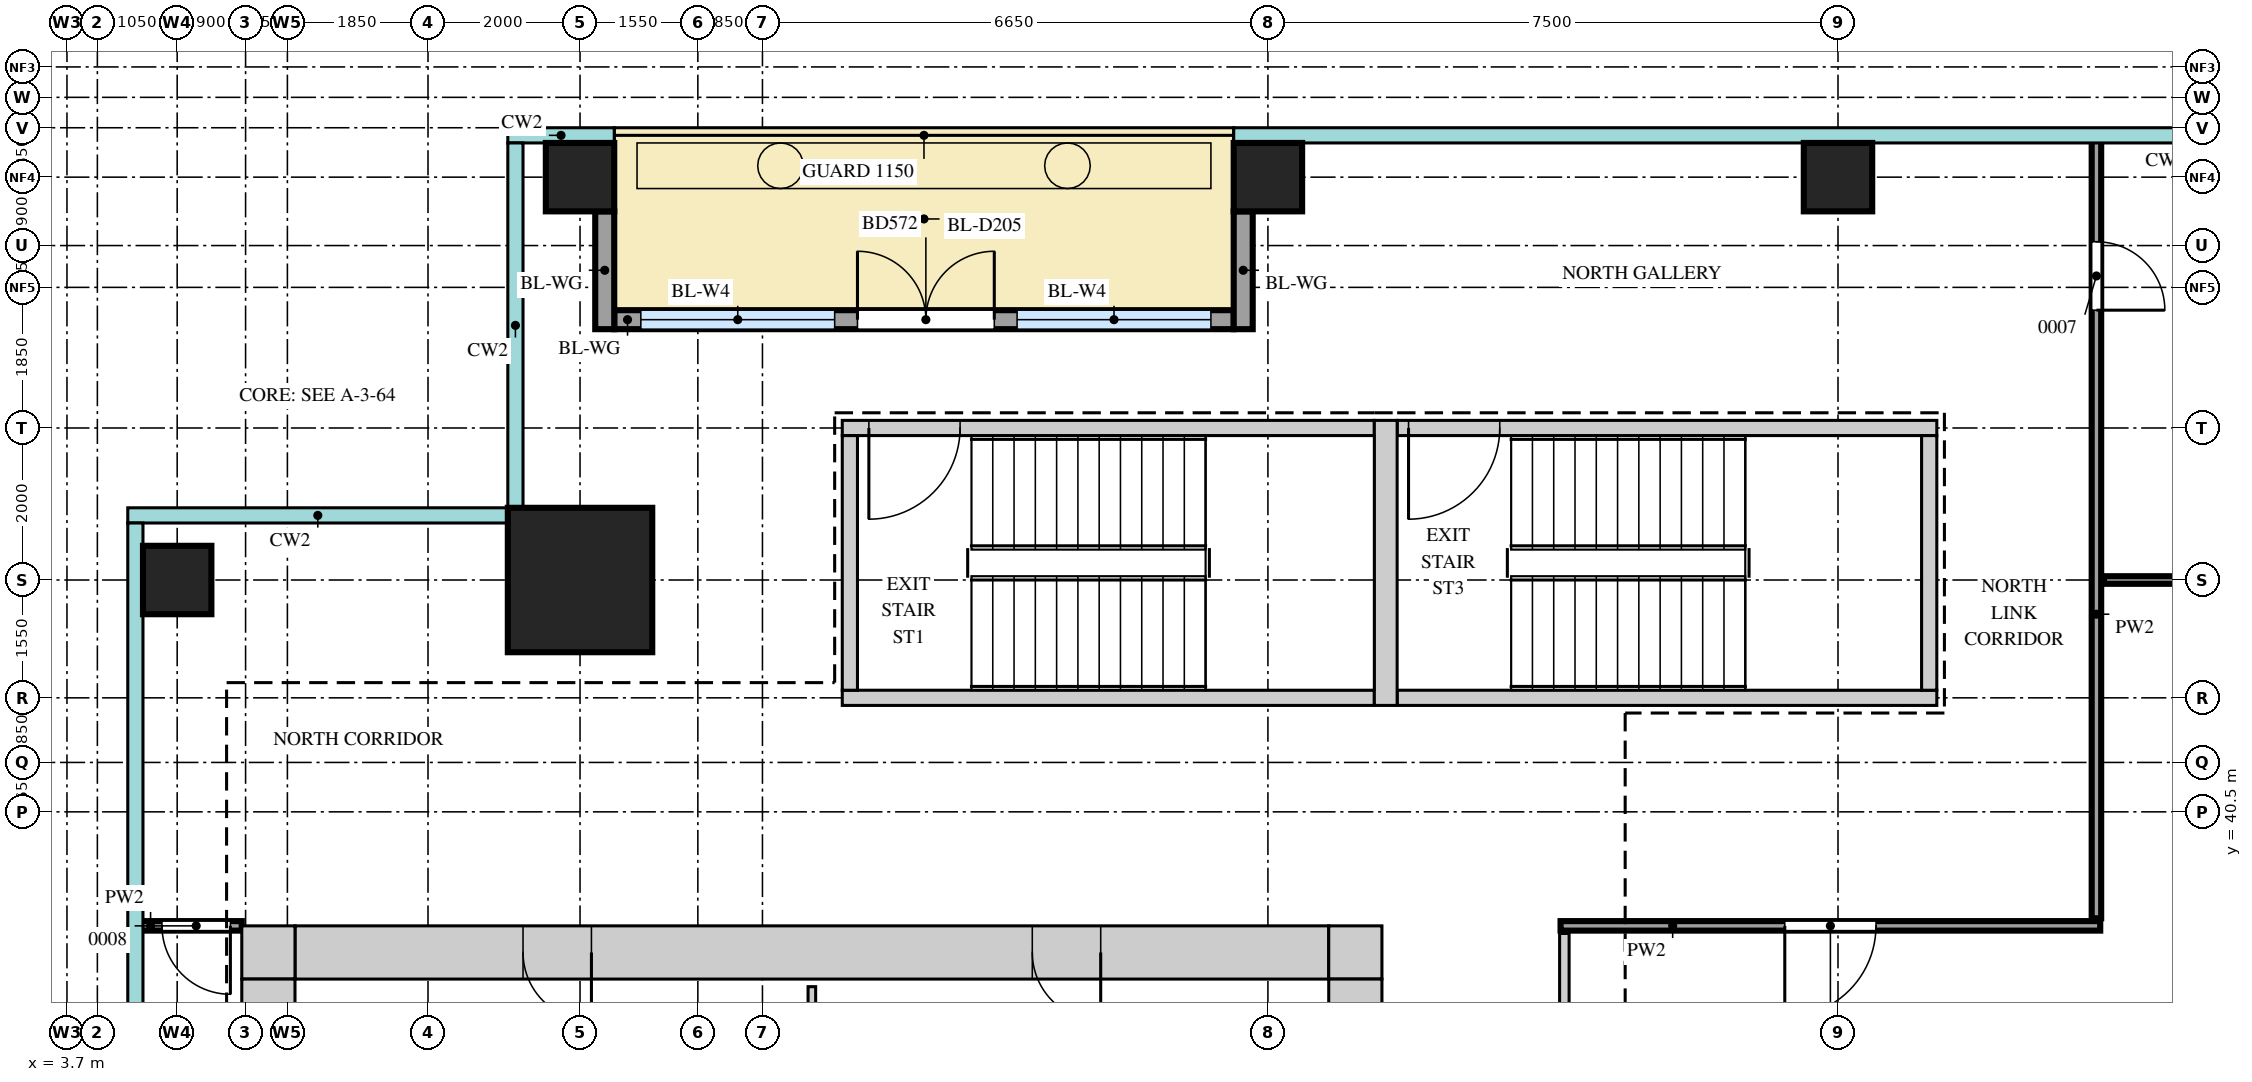
"""IFC4 building model, lengths in metres.
Left out: names, types, materials, properties, quantities, classifications, styles, units other than length and angle.
Written with IfcOpenShell. Run it as: python <this file> out.ifc"""

import sys

from ifc_helpers import new_model, si_unit, direction, frame, frame_2d, origin, origin_2d, place, context, subcontext, project, spatial, rectangle, extrude, source, transform, mapped, element, fill, save


model = new_model("IFC4")
c1 = context("Model", 3, precision=1e-05, world=origin(), true_north=direction((0.0, 1.0)))
c2 = subcontext(c1, "Body", "Model", "MODEL_VIEW")
j1 = project(units=[si_unit("LENGTHUNIT", "METRE"), si_unit("PLANEANGLEUNIT", "RADIAN")], contexts=[c1])
p1 = place(None, origin())
s1 = spatial("IfcSite", under=j1, at=p1, CompositionType="ELEMENT")
p2 = place(p1, origin())
s2 = spatial("IfcBuilding", under=s1, at=p2, CompositionType="ELEMENT")
p3 = place(p2, frame((0.0, 0.0, 254.2)))
s3 = spatial("IfcBuildingStorey", under=s2, at=p3, CompositionType="ELEMENT", Elevation=254.2)
m1 = source(origin(), c2, "Body", "SweptSolid", [
    extrude(rectangle(XDim=13.6, YDim=0.7, at=frame_2d((6.8, 0.0))), origin(), (0.0, 0.0, 1.0), 3.75),
])
p4 = place(p3, frame((6.7, 38.65, 0.0), z_axis=(0.0, 0.0, 1.0), x_axis=(1.0, 0.0, 0.0)))
e1 = element("IfcWall", 1, at=p4, inside=s3, PredefinedType="SHEAR", context=c2, shape_type="MappedRepresentation", body=[
    mapped(m1, transform((0.0, 0.0, 0.0))),
])
m2 = source(origin(), c2, "Body", "SweptSolid", [
    extrude(rectangle(XDim=0.9, YDim=2.1, at=frame_2d((0.45, 1.05))), frame((0.0, 0.36, 0.0), z_axis=(0.0, -1.0, 0.0), x_axis=(1.0, 0.0, 0.0)), (0.0, 0.0, 1.0), 0.72),
])
p5 = place(p4, frame((3.0, 0.0, 0.0)))
e2 = element("IfcOpeningElement", 2, at=p5, cuts=e1, PredefinedType="OPENING", context=c2, shape_type="MappedRepresentation", body=[
    mapped(m2, transform((0.0, 0.0, 0.0))),
])
p6 = place(p4, frame((9.7, 0.0, 0.0)))
e3 = element("IfcOpeningElement", 3, at=p6, cuts=e1, PredefinedType="OPENING", context=c2, shape_type="MappedRepresentation", body=[
    mapped(m2, transform((0.0, 0.0, 0.0))),
])
m3 = source(origin(), c2, "Body", "SweptSolid", [
    extrude(rectangle(XDim=0.7, YDim=0.7, at=frame_2d((0.35, 0.0))), origin(), (0.0, 0.0, 1.0), 3.75),
])
for number, where, z_axis, x_axis in (
    (4, (20.3, 38.65, 0.0), (0.0, 0.0, 1.0), (1.0, 0.0, 0.0)),
    (5, (6.0, 38.65, 0.0), (0.0, 0.0, 1.0), (1.0, 0.0, 0.0)),
):
    element("IfcWall", number, at=place(p3, frame(where, z_axis=z_axis, x_axis=x_axis)), inside=s3, PredefinedType="SHEAR", context=c2, shape_type="MappedRepresentation", body=[
        mapped(m3, transform((0.0, 0.0, 0.0))),
    ])
m4 = source(origin(), c2, "Body", "SweptSolid", [
    extrude(rectangle(XDim=22.6, YDim=0.7, at=frame_2d((11.3, 0.0))), origin(), (0.0, 0.0, 1.0), 3.75),
])
p7 = place(p3, frame((20.65, 15.7, 0.0), z_axis=(0.0, 0.0, 1.0), x_axis=(0.0, 1.0, 0.0)))
e6 = element("IfcWall", 6, at=p7, inside=s3, PredefinedType="SHEAR", context=c2, shape_type="MappedRepresentation", body=[
    mapped(m4, transform((0.0, 0.0, 0.0))),
])
m5 = source(origin(), c2, "Body", "SweptSolid", [
    extrude(rectangle(XDim=1.8, YDim=2.1, at=frame_2d((0.9, 1.05))), frame((0.0, 0.36, 0.0), z_axis=(0.0, -1.0, 0.0), x_axis=(1.0, 0.0, 0.0)), (0.0, 0.0, 1.0), 0.72),
])
p8 = place(p7, frame((10.8, 0.0, 0.0)))
e7 = element("IfcOpeningElement", 7, at=p8, cuts=e6, PredefinedType="OPENING", context=c2, shape_type="MappedRepresentation", body=[
    mapped(m5, transform((0.0, 0.0, 0.0))),
])
p9 = place(p7, frame((0.45, 0.0, 0.0)))
e8 = element("IfcOpeningElement", 8, at=p9, cuts=e6, PredefinedType="OPENING", context=c2, shape_type="MappedRepresentation", body=[
    mapped(m2, transform((0.0, 0.0, 0.0))),
])
p10 = place(p7, frame((2.9, 0.0, 0.0)))
e9 = element("IfcOpeningElement", 9, at=p10, cuts=e6, PredefinedType="OPENING", context=c2, shape_type="MappedRepresentation", body=[
    mapped(m2, transform((0.0, 0.0, 0.0))),
])
p11 = place(p7, frame((5.65, 0.0, 0.0)))
e10 = element("IfcOpeningElement", 10, at=p11, cuts=e6, PredefinedType="OPENING", context=c2, shape_type="MappedRepresentation", body=[
    mapped(m2, transform((0.0, 0.0, 0.0))),
])
p12 = place(p3, frame((6.35, 15.7, 0.0), z_axis=(0.0, 0.0, 1.0), x_axis=(0.0, 1.0, 0.0)))
e11 = element("IfcWall", 11, at=p12, inside=s3, PredefinedType="SHEAR", context=c2, shape_type="MappedRepresentation", body=[
    mapped(m4, transform((0.0, 0.0, 0.0))),
])
m6 = source(origin(), c2, "Body", "SweptSolid", [
    extrude(rectangle(XDim=7.0, YDim=0.2, at=frame_2d((3.5, 0.0))), origin(), (0.0, 0.0, 1.0), 3.75),
])
p13 = place(p3, frame((13.9, 45.55, 0.0), z_axis=(0.0, 0.0, 1.0), x_axis=(1.0, 0.0, 0.0)))
e12 = element("IfcWall", 12, at=p13, inside=s3, PredefinedType="SHEAR", context=c2, shape_type="MappedRepresentation", body=[
    mapped(m6, transform((0.0, 0.0, 0.0))),
])
m7 = source(origin(), c2, "Body", "SweptSolid", [
    extrude(rectangle(XDim=1.2, YDim=2.1, at=frame_2d((0.6, 1.05))), frame((0.0, 0.11, 0.0), z_axis=(0.0, -1.0, 0.0), x_axis=(1.0, 0.0, 0.0)), (0.0, 0.0, 1.0), 0.22),
])
p14 = place(p13, frame((0.35, 0.0, 0.0)))
e13 = element("IfcOpeningElement", 13, at=p14, cuts=e12, PredefinedType="OPENING", context=c2, shape_type="MappedRepresentation", body=[
    mapped(m7, transform((0.0, 0.0, 0.0))),
])
p15 = place(p3, frame((13.9, 42.0, 0.0), z_axis=(0.0, 0.0, 1.0), x_axis=(1.0, 0.0, 0.0)))
e14 = element("IfcWall", 14, at=p15, inside=s3, PredefinedType="SHEAR", context=c2, shape_type="MappedRepresentation", body=[
    mapped(m6, transform((0.0, 0.0, 0.0))),
])
m8 = source(origin(), c2, "Body", "SweptSolid", [
    extrude(rectangle(XDim=7.1, YDim=0.2, at=frame_2d((3.55, 0.0))), origin(), (0.0, 0.0, 1.0), 3.75),
])
p16 = place(p3, frame((21.2, 45.55, 0.0), z_axis=(0.0, 0.0, 1.0), x_axis=(1.0, 0.0, 0.0)))
e15 = element("IfcWall", 15, at=p16, inside=s3, PredefinedType="SHEAR", context=c2, shape_type="MappedRepresentation", body=[
    mapped(m8, transform((0.0, 0.0, 0.0))),
])
p17 = place(p16, frame((0.15, 0.0, 0.0)))
e16 = element("IfcOpeningElement", 16, at=p17, cuts=e15, PredefinedType="OPENING", context=c2, shape_type="MappedRepresentation", body=[
    mapped(m7, transform((0.0, 0.0, 0.0))),
])
p18 = place(p3, frame((21.2, 42.0, 0.0), z_axis=(0.0, 0.0, 1.0), x_axis=(1.0, 0.0, 0.0)))
e17 = element("IfcWall", 17, at=p18, inside=s3, PredefinedType="SHEAR", context=c2, shape_type="MappedRepresentation", body=[
    mapped(m8, transform((0.0, 0.0, 0.0))),
])
m9 = source(origin(), c2, "Body", "SweptSolid", [
    extrude(rectangle(XDim=3.75, YDim=0.3, at=frame_2d((1.875, 0.0))), origin(), (0.0, 0.0, 1.0), 3.75),
])
p19 = place(p3, frame((21.05, 41.9, 0.0), z_axis=(0.0, 0.0, 1.0), x_axis=(0.0, 1.0, 0.0)))
e18 = element("IfcWall", 18, at=p19, inside=s3, PredefinedType="SHEAR", context=c2, shape_type="MappedRepresentation", body=[
    mapped(m9, transform((0.0, 0.0, 0.0))),
])
m10 = source(origin(), c2, "Body", "SweptSolid", [
    extrude(rectangle(XDim=3.35, YDim=0.2, at=frame_2d((1.675, 0.0))), origin(), (0.0, 0.0, 1.0), 3.75),
])
for number, where, z_axis, x_axis in (
    (19, (14.0, 42.1, 0.0), (0.0, 0.0, 1.0), (0.0, 1.0, 0.0)),
    (20, (28.2, 42.1, 0.0), (0.0, 0.0, 1.0), (0.0, 1.0, 0.0)),
):
    element("IfcWall", number, at=place(p3, frame(where, z_axis=z_axis, x_axis=x_axis)), inside=s3, PredefinedType="SHEAR", context=c2, shape_type="MappedRepresentation", body=[
        mapped(m10, transform((0.0, 0.0, 0.0))),
    ])
m11 = source(origin(), c2, "Body", "SweptSolid", [
    extrude(rectangle(XDim=1.9, YDim=1.9, at=origin_2d()), origin(), (0.0, 0.0, 1.0), 4.0),
])
p20 = place(p3, frame((10.45, 43.55, 0.0), z_axis=(0.0, 0.0, 1.0), x_axis=(1.0, 0.0, 0.0)))
e21 = element("IfcColumn", 21, at=p20, inside=s3, PredefinedType="COLUMN", context=c2, shape_type="MappedRepresentation", body=[
    mapped(m11, transform((0.0, 0.0, 0.0))),
])
m12 = source(origin(), c2, "Body", "SweptSolid", [
    extrude(rectangle(XDim=0.9, YDim=0.9, at=origin_2d()), origin(), (0.0, 0.0, 1.0), 3.75),
])
for number, where, z_axis, x_axis in (
    (22, (10.45, 48.85, 0.0), (0.0, 0.0, 1.0), (1.0, 0.0, 0.0)),
    (23, (19.5, 48.85, 0.0), (0.0, 0.0, 1.0), (1.0, 0.0, 0.0)),
    (24, (27.0, 48.85, 0.0), (0.0, 0.0, 1.0), (1.0, 0.0, 0.0)),
    (25, (5.15, 43.55, 0.0), (0.0, 0.0, 1.0), (1.0, 0.0, 0.0)),
):
    element("IfcColumn", number, at=place(p3, frame(where, z_axis=z_axis, x_axis=x_axis)), inside=s3, PredefinedType="COLUMN", context=c2, shape_type="MappedRepresentation", body=[
        mapped(m12, transform((0.0, 0.0, 0.0))),
    ])
m13 = source(origin(), c2, "Body", "SweptSolid", [
    extrude(rectangle(XDim=8.15, YDim=0.25, at=frame_2d((4.075, 0.0))), origin(), (0.0, 0.0, 1.0), 3.35),
])
p21 = place(p3, frame((10.9, 46.975, 0.0), z_axis=(0.0, 0.0, 1.0), x_axis=(1.0, 0.0, 0.0)))
e26 = element("IfcWall", 26, at=p21, inside=s3, PredefinedType="SOLIDWALL", context=c2, shape_type="MappedRepresentation", body=[
    mapped(m13, transform((0.0, 0.0, 0.0))),
])
m14 = source(origin(), c2, "Body", "SweptSolid", [
    extrude(rectangle(XDim=2.55, YDim=2.4, at=frame_2d((1.275, 1.2))), frame((0.0, 0.135, 0.0), z_axis=(0.0, -1.0, 0.0), x_axis=(1.0, 0.0, 0.0)), (0.0, 0.0, 1.0), 0.27),
])
p22 = place(p21, frame((0.35, 0.0, 0.0)))
e27 = element("IfcOpeningElement", 27, at=p22, cuts=e26, PredefinedType="OPENING", context=c2, shape_type="MappedRepresentation", body=[
    mapped(m14, transform((0.0, 0.0, 0.0))),
])
p23 = place(p21, frame((5.3, 0.0, 0.0)))
e28 = element("IfcOpeningElement", 28, at=p23, cuts=e26, PredefinedType="OPENING", context=c2, shape_type="MappedRepresentation", body=[
    mapped(m14, transform((0.0, 0.0, 0.0))),
])
m15 = source(origin(), c2, "Body", "SweptSolid", [
    extrude(rectangle(XDim=1.8, YDim=2.4, at=frame_2d((0.9, 1.2))), frame((0.0, 0.135, 0.0), z_axis=(0.0, -1.0, 0.0), x_axis=(1.0, 0.0, 0.0)), (0.0, 0.0, 1.0), 0.27),
])
p24 = place(p21, frame((3.2, 0.0, 0.0)))
e29 = element("IfcOpeningElement", 29, at=p24, cuts=e26, PredefinedType="OPENING", context=c2, shape_type="MappedRepresentation", body=[
    mapped(m15, transform((0.0, 0.0, 0.0))),
])
m16 = source(origin(), c2, "Body", "SweptSolid", [
    extrude(rectangle(XDim=1.55, YDim=0.25, at=frame_2d((0.775, 0.0))), origin(), (0.0, 0.0, 1.0), 3.35),
])
for number, where, z_axis, x_axis in (
    (30, (10.775, 48.4, 0.0), (0.0, 0.0, 1.0), (0.0, -1.0, 0.0)),
    (31, (19.175, 48.4, 0.0), (0.0, 0.0, 1.0), (0.0, -1.0, 0.0)),
):
    element("IfcWall", number, at=place(p3, frame(where, z_axis=z_axis, x_axis=x_axis)), inside=s3, PredefinedType="SOLIDWALL", context=c2, shape_type="MappedRepresentation", body=[
        mapped(m16, transform((0.0, 0.0, 0.0))),
    ])
m17 = source(origin(), c2, "Body", "SweptSolid", [
    extrude(rectangle(XDim=20.8, YDim=0.125, at=frame_2d((10.4, 0.0))), origin(), (0.0, 0.0, 1.0), 3.8),
])
p25 = place(p3, frame((23.4, 18.1, 0.0), z_axis=(0.0, 0.0, 1.0), x_axis=(0.0, 1.0, 0.0)))
e32 = element("IfcWall", 32, at=p25, inside=s3, PredefinedType="PARTITIONING", context=c2, shape_type="MappedRepresentation", body=[
    mapped(m17, transform((0.0, 0.0, 0.0))),
])
m18 = source(origin(), c2, "Body", "SweptSolid", [
    extrude(rectangle(XDim=1.2, YDim=2.1, at=frame_2d((0.6, 1.05))), frame((0.0, 0.073, 0.0), z_axis=(0.0, -1.0, 0.0), x_axis=(1.0, 0.0, 0.0)), (0.0, 0.0, 1.0), 0.145),
])
p26 = place(p25, frame((12.05, 0.0, 0.0)))
e33 = element("IfcOpeningElement", 33, at=p26, cuts=e32, PredefinedType="OPENING", context=c2, shape_type="MappedRepresentation", body=[
    mapped(m18, transform((0.0, 0.0, 0.0))),
])
m19 = source(origin(), c2, "Body", "SweptSolid", [
    extrude(rectangle(XDim=6.0, YDim=0.1, at=frame_2d((3.0, 0.0))), origin(), (0.0, 0.0, 1.0), 3.8),
])
p27 = place(p3, frame((13.5, 32.2, 0.0), z_axis=(0.0, 0.0, 1.0), x_axis=(0.0, 1.0, 0.0)))
e34 = element("IfcWall", 34, at=p27, inside=s3, PredefinedType="PARTITIONING", context=c2, shape_type="MappedRepresentation", body=[
    mapped(m19, transform((0.0, 0.0, 0.0))),
])
m20 = source(origin(), c2, "Body", "SweptSolid", [
    extrude(rectangle(XDim=1.35, YDim=0.125, at=frame_2d((0.675, 0.0))), origin(), (0.0, 0.0, 1.0), 3.8),
])
p28 = place(p3, frame((4.65, 39.0, 0.0), z_axis=(0.0, 0.0, 1.0), x_axis=(1.0, 0.0, 0.0)))
e35 = element("IfcWall", 35, at=p28, inside=s3, PredefinedType="PARTITIONING", context=c2, shape_type="MappedRepresentation", body=[
    mapped(m20, transform((0.0, 0.0, 0.0))),
])
m21 = source(origin(), c2, "Body", "SweptSolid", [
    extrude(rectangle(XDim=0.9, YDim=2.1, at=frame_2d((0.45, 1.05))), frame((0.0, 0.073, 0.0), z_axis=(0.0, -1.0, 0.0), x_axis=(1.0, 0.0, 0.0)), (0.0, 0.0, 1.0), 0.145),
])
p29 = place(p28, frame((0.3, 0.0, 0.0)))
e36 = element("IfcOpeningElement", 36, at=p29, cuts=e35, PredefinedType="OPENING", context=c2, shape_type="MappedRepresentation", body=[
    mapped(m21, transform((0.0, 0.0, 0.0))),
])
m22 = source(origin(), c2, "Body", "SweptSolid", [
    extrude(rectangle(XDim=7.1, YDim=0.125, at=frame_2d((3.55, 0.0))), origin(), (0.0, 0.0, 1.0), 3.8),
])
p30 = place(p3, frame((23.35, 39.0, 0.0), z_axis=(0.0, 0.0, 1.0), x_axis=(1.0, 0.0, 0.0)))
e37 = element("IfcWall", 37, at=p30, inside=s3, PredefinedType="PARTITIONING", context=c2, shape_type="MappedRepresentation", body=[
    mapped(m22, transform((0.0, 0.0, 0.0))),
])
p31 = place(p30, frame((2.95, 0.0, 0.0)))
e38 = element("IfcOpeningElement", 38, at=p31, cuts=e37, PredefinedType="OPENING", context=c2, shape_type="MappedRepresentation", body=[
    mapped(m18, transform((0.0, 0.0, 0.0))),
])
m23 = source(origin(), c2, "Body", "SweptSolid", [
    extrude(rectangle(XDim=10.25, YDim=0.125, at=frame_2d((5.125, 0.0))), origin(), (0.0, 0.0, 1.0), 3.8),
])
p32 = place(p3, frame((30.4, 39.1, 0.0), z_axis=(0.0, 0.0, 1.0), x_axis=(0.0, 1.0, 0.0)))
e39 = element("IfcWall", 39, at=p32, inside=s3, PredefinedType="PARTITIONING", context=c2, shape_type="MappedRepresentation", body=[
    mapped(m23, transform((0.0, 0.0, 0.0))),
])
p33 = place(p32, frame((8.0, 0.0, 0.0)))
e40 = element("IfcOpeningElement", 40, at=p33, cuts=e39, PredefinedType="OPENING", context=c2, shape_type="MappedRepresentation", body=[
    mapped(m21, transform((0.0, 0.0, 0.0))),
])
m24 = source(origin(), c2, "Body", "SweptSolid", [
    extrude(rectangle(XDim=18.85, YDim=0.1, at=frame_2d((9.425, 0.0))), origin(), (0.0, 0.0, 1.0), 3.3),
])
p34 = place(p3, frame((30.5, 43.55, 0.0), z_axis=(0.0, 0.0, 1.0), x_axis=(1.0, 0.0, 0.0)))
e41 = element("IfcWall", 41, at=p34, inside=s3, PredefinedType="PARTITIONING", context=c2, shape_type="MappedRepresentation", body=[
    mapped(m24, transform((0.0, 0.0, 0.0))),
])
m25 = source(origin(), c2, "Body", "SweptSolid", [
    extrude(rectangle(XDim=2.55, YDim=2.4, at=frame_2d((1.275, 1.2))), frame((0.0, 0.03, 0.0), z_axis=(0.0, -1.0, 0.0), x_axis=(1.0, 0.0, 0.0)), (0.0, 0.0, 1.0), 0.06),
])
p35 = place(p22, origin())
e42 = element("IfcWindow", 42, at=p35, inside=s3, PartitioningType="SINGLE_PANEL", PredefinedType="WINDOW", context=c2, shape_type="MappedRepresentation", body=[
    mapped(m25, transform((0.0, 0.0, 0.0))),
])
fill(e27, e42)
p36 = place(p23, origin())
e43 = element("IfcWindow", 43, at=p36, inside=s3, PartitioningType="SINGLE_PANEL", PredefinedType="WINDOW", context=c2, shape_type="MappedRepresentation", body=[
    mapped(m25, transform((0.0, 0.0, 0.0))),
])
fill(e28, e43)
m26 = source(origin(), c2, "Body", "SweptSolid", [
    extrude(rectangle(XDim=1.8, YDim=2.4, at=frame_2d((0.9, 1.2))), frame((0.0, 0.025, 0.0), z_axis=(0.0, -1.0, 0.0), x_axis=(1.0, 0.0, 0.0)), (0.0, 0.0, 1.0), 0.05),
])
p37 = place(p24, origin())
e44 = element("IfcDoor", 44, at=p37, inside=s3, OperationType="DOUBLE_DOOR_DOUBLE_SWING", PredefinedType="DOOR", context=c2, shape_type="MappedRepresentation", body=[
    mapped(m26, transform((0.0, 0.0, 0.0))),
])
fill(e29, e44)
m27 = source(origin(), c2, "Body", "SweptSolid", [
    extrude(rectangle(XDim=0.9, YDim=2.1, at=frame_2d((0.45, 1.05))), frame((0.0, 0.3, 0.0), z_axis=(0.0, -1.0, 0.0), x_axis=(1.0, 0.0, 0.0)), (0.0, 0.0, 1.0), 0.6),
])
p38 = place(p5, origin())
e45 = element("IfcDoor", 45, at=p38, inside=s3, OperationType="SINGLE_SWING_RIGHT", PredefinedType="DOOR", context=c2, shape_type="MappedRepresentation", body=[
    mapped(m27, transform((0.0, 0.0, 0.0))),
])
fill(e2, e45)
p39 = place(p6, origin())
e46 = element("IfcDoor", 46, at=p39, inside=s3, OperationType="SINGLE_SWING_RIGHT", PredefinedType="DOOR", context=c2, shape_type="MappedRepresentation", body=[
    mapped(m27, transform((0.0, 0.0, 0.0))),
])
fill(e3, e46)
m28 = source(origin(), c2, "Body", "SweptSolid", [
    extrude(rectangle(XDim=0.9, YDim=2.1, at=frame_2d((0.45, 1.05))), frame((0.0, 0.025, 0.0), z_axis=(0.0, -1.0, 0.0), x_axis=(1.0, 0.0, 0.0)), (0.0, 0.0, 1.0), 0.05),
])
p40 = place(p29, origin())
e47 = element("IfcDoor", 47, at=p40, inside=s3, OperationType="SINGLE_SWING_RIGHT", PredefinedType="DOOR", context=c2, shape_type="MappedRepresentation", body=[
    mapped(m28, transform((0.0, 0.0, 0.0))),
])
fill(e36, e47)
m29 = source(origin(), c2, "Body", "SweptSolid", [
    extrude(rectangle(XDim=1.2, YDim=2.1, at=frame_2d((0.6, 1.05))), frame((0.0, 0.025, 0.0), z_axis=(0.0, -1.0, 0.0), x_axis=(1.0, 0.0, 0.0)), (0.0, 0.0, 1.0), 0.05),
])
p41 = place(p31, origin())
e48 = element("IfcDoor", 48, at=p41, inside=s3, OperationType="SINGLE_SWING_LEFT", PredefinedType="DOOR", context=c2, shape_type="MappedRepresentation", body=[
    mapped(m29, transform((0.0, 0.0, 0.0))),
])
fill(e38, e48)
p42 = place(p33, origin())
e49 = element("IfcDoor", 49, at=p42, inside=s3, OperationType="SINGLE_SWING_LEFT", PredefinedType="DOOR", context=c2, shape_type="MappedRepresentation", body=[
    mapped(m28, transform((0.0, 0.0, 0.0))),
])
fill(e40, e49)
p43 = place(p14, origin())
e50 = element("IfcDoor", 50, at=p43, inside=s3, OperationType="SINGLE_SWING_LEFT", PredefinedType="DOOR", context=c2, shape_type="MappedRepresentation", body=[
    mapped(m29, transform((0.0, 0.0, 0.0))),
])
fill(e13, e50)
p44 = place(p17, origin())
e51 = element("IfcDoor", 51, at=p44, inside=s3, OperationType="SINGLE_SWING_LEFT", PredefinedType="DOOR", context=c2, shape_type="MappedRepresentation", body=[
    mapped(m29, transform((0.0, 0.0, 0.0))),
])
fill(e16, e51)
save(model, sys.argv[1])
